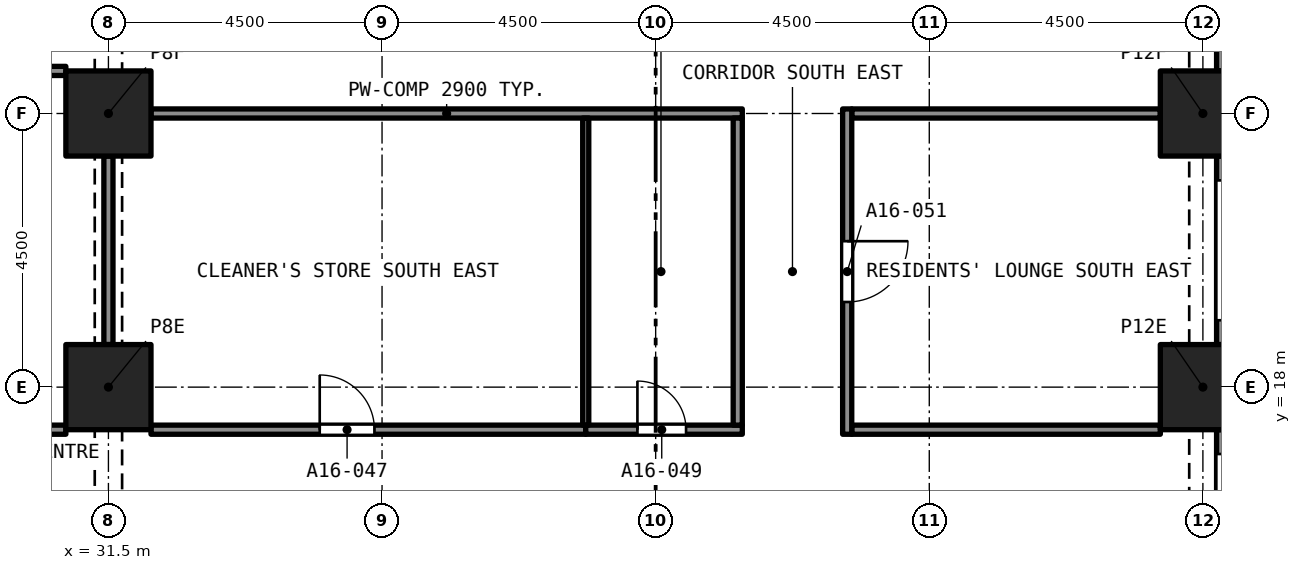
"""IFC4 building model, lengths in metres.
Left out: names, types, materials, properties, quantities, classifications, styles, units other than length and angle.
Written with IfcOpenShell. Run it as: python <this file> out.ifc"""

import sys

from ifc_helpers import new_model, si_unit, direction, frame, frame_2d, origin, origin_2d, place, context, subcontext, project, spatial, rectangle, extrude, element, fill, save


model = new_model("IFC4")
c1 = context("Model", 3, precision=1e-05, world=origin(), true_north=direction((0.0, 1.0)))
c2 = subcontext(c1, "Body", "Model", "MODEL_VIEW")
j1 = project(units=[si_unit("LENGTHUNIT", "METRE"), si_unit("PLANEANGLEUNIT", "RADIAN")], contexts=[c1])
p1 = place(None, origin())
s1 = spatial("IfcSite", under=j1, at=p1, CompositionType="ELEMENT")
p2 = place(p1, origin())
s2 = spatial("IfcBuilding", under=s1, at=p2, CompositionType="ELEMENT")
p3 = place(p2, frame((0.0, 0.0, 62.4)))
s3 = spatial("IfcBuildingStorey", under=s2, at=p3, CompositionType="ELEMENT", Elevation=62.4)
for number, where, z_axis, x_axis in (
    (1, (31.5, 18.0, 0.0), (0.0, 0.0, 1.0), (1.0, 0.0, 0.0)),
    (2, (49.5, 18.0, 0.0), (0.0, 0.0, 1.0), (1.0, 0.0, 0.0)),
    (3, (31.5, 22.5, 0.0), (0.0, 0.0, 1.0), (1.0, 0.0, 0.0)),
    (4, (49.5, 22.5, 0.0), (0.0, 0.0, 1.0), (1.0, 0.0, 0.0)),
):
    element("IfcColumn", number, at=place(p3, frame(where, z_axis=z_axis, x_axis=x_axis)), inside=s3, PredefinedType="COLUMN", context=c2, shape_type="SweptSolid", body=[
        extrude(rectangle(XDim=1.4, YDim=1.4, at=origin_2d()), origin(), (0.0, 0.0, 1.0), 3.2),
    ])
p4 = place(p3, frame((49.875, 17.3, 0.0), z_axis=(0.0, 0.0, 1.0), x_axis=(0.0, -1.0, 0.0)))
e5 = element("IfcWall", 5, at=p4, inside=s3, PredefinedType="SOLIDWALL", context=c2, shape_type="SweptSolid", body=[
    extrude(rectangle(XDim=3.1, YDim=0.3, at=frame_2d((1.55, 0.0))), origin(), (0.0, 0.0, 1.0), 3.2),
])
p5 = place(p4, frame((0.4, 0.0, 0.45)))
e6 = element("IfcOpeningElement", 6, at=p5, cuts=e5, PredefinedType="OPENING", context=c2, shape_type="SweptSolid", body=[
    extrude(rectangle(XDim=2.3, YDim=1.95, at=frame_2d((1.15, 0.975))), frame((0.0, 0.16, 0.0), z_axis=(0.0, -1.0, 0.0), x_axis=(1.0, 0.0, 0.0)), (0.0, 0.0, 1.0), 0.32),
])
p6 = place(p3, frame((49.875, 21.8, 0.0), z_axis=(0.0, 0.0, 1.0), x_axis=(0.0, -1.0, 0.0)))
e7 = element("IfcWall", 7, at=p6, inside=s3, PredefinedType="SOLIDWALL", context=c2, shape_type="SweptSolid", body=[
    extrude(rectangle(XDim=3.1, YDim=0.3, at=frame_2d((1.55, 0.0))), origin(), (0.0, 0.0, 1.0), 3.2),
])
p7 = place(p6, frame((0.4, 0.0, 0.45)))
e8 = element("IfcOpeningElement", 8, at=p7, cuts=e7, PredefinedType="OPENING", context=c2, shape_type="SweptSolid", body=[
    extrude(rectangle(XDim=2.3, YDim=1.95, at=frame_2d((1.15, 0.975))), frame((0.0, 0.16, 0.0), z_axis=(0.0, -1.0, 0.0), x_axis=(1.0, 0.0, 0.0)), (0.0, 0.0, 1.0), 0.32),
])
p8 = place(p3, frame((49.875, 26.3, 0.0), z_axis=(0.0, 0.0, 1.0), x_axis=(0.0, -1.0, 0.0)))
e9 = element("IfcWall", 9, at=p8, inside=s3, PredefinedType="SOLIDWALL", context=c2, shape_type="SweptSolid", body=[
    extrude(rectangle(XDim=3.1, YDim=0.3, at=frame_2d((1.55, 0.0))), origin(), (0.0, 0.0, 1.0), 3.2),
])
p9 = place(p8, frame((0.4, 0.0, 0.45)))
e10 = element("IfcOpeningElement", 10, at=p9, cuts=e9, PredefinedType="OPENING", context=c2, shape_type="SweptSolid", body=[
    extrude(rectangle(XDim=2.3, YDim=1.95, at=frame_2d((1.15, 0.975))), frame((0.0, 0.16, 0.0), z_axis=(0.0, -1.0, 0.0), x_axis=(1.0, 0.0, 0.0)), (0.0, 0.0, 1.0), 0.32),
])
p10 = place(p3, frame((25.725, 17.3, 0.0), z_axis=(0.0, 0.0, 1.0), x_axis=(1.0, 0.0, 0.0)))
e11 = element("IfcWall", 11, at=p10, inside=s3, PredefinedType="PARTITIONING", context=c2, shape_type="SweptSolid", body=[
    extrude(rectangle(XDim=5.075, YDim=0.15, at=frame_2d((2.538, 0.0))), origin(), (0.0, 0.0, 1.0), 2.75),
])
p11 = place(p3, frame((32.2, 17.3, 0.0), z_axis=(0.0, 0.0, 1.0), x_axis=(1.0, 0.0, 0.0)))
e12 = element("IfcWall", 12, at=p11, inside=s3, PredefinedType="PARTITIONING", context=c2, shape_type="SweptSolid", body=[
    extrude(rectangle(XDim=7.15, YDim=0.15, at=frame_2d((3.575, 0.0))), origin(), (0.0, 0.0, 1.0), 2.9),
])
p12 = place(p11, frame((2.775, 0.0, 0.0)))
e13 = element("IfcOpeningElement", 13, at=p12, cuts=e12, PredefinedType="OPENING", context=c2, shape_type="SweptSolid", body=[
    extrude(rectangle(XDim=0.9, YDim=2.1, at=frame_2d((0.45, 1.05))), frame((0.0, 0.085, 0.0), z_axis=(0.0, -1.0, 0.0), x_axis=(1.0, 0.0, 0.0)), (0.0, 0.0, 1.0), 0.17),
])
p13 = place(p3, frame((39.35, 17.3, 0.0), z_axis=(0.0, 0.0, 1.0), x_axis=(1.0, 0.0, 0.0)))
e14 = element("IfcWall", 14, at=p13, inside=s3, PredefinedType="PARTITIONING", context=c2, shape_type="SweptSolid", body=[
    extrude(rectangle(XDim=2.575, YDim=0.15, at=frame_2d((1.288, 0.0))), origin(), (0.0, 0.0, 1.0), 2.9),
])
p14 = place(p13, frame((0.85, 0.0, 0.0)))
e15 = element("IfcOpeningElement", 15, at=p14, cuts=e14, PredefinedType="OPENING", context=c2, shape_type="SweptSolid", body=[
    extrude(rectangle(XDim=0.8, YDim=2.1, at=frame_2d((0.4, 1.05))), frame((0.0, 0.085, 0.0), z_axis=(0.0, -1.0, 0.0), x_axis=(1.0, 0.0, 0.0)), (0.0, 0.0, 1.0), 0.17),
])
p15 = place(p3, frame((43.725, 17.3, 0.0), z_axis=(0.0, 0.0, 1.0), x_axis=(1.0, 0.0, 0.0)))
e16 = element("IfcWall", 16, at=p15, inside=s3, PredefinedType="PARTITIONING", context=c2, shape_type="SweptSolid", body=[
    extrude(rectangle(XDim=5.075, YDim=0.15, at=frame_2d((2.538, 0.0))), origin(), (0.0, 0.0, 1.0), 2.9),
])
p16 = place(p3, frame((25.725, 23.2, 0.0), z_axis=(0.0, 0.0, 1.0), x_axis=(1.0, 0.0, 0.0)))
e17 = element("IfcWall", 17, at=p16, inside=s3, PredefinedType="PARTITIONING", context=c2, shape_type="SweptSolid", body=[
    extrude(rectangle(XDim=5.075, YDim=0.15, at=frame_2d((2.538, 0.0))), origin(), (0.0, 0.0, 1.0), 2.75),
])
p17 = place(p3, frame((31.5, 18.7, 0.0), z_axis=(0.0, 0.0, 1.0), x_axis=(0.0, 1.0, 0.0)))
e18 = element("IfcWall", 18, at=p17, inside=s3, PredefinedType="PARTITIONING", context=c2, shape_type="SweptSolid", body=[
    extrude(rectangle(XDim=3.1, YDim=0.15, at=frame_2d((1.55, 0.0))), origin(), (0.0, 0.0, 1.0), 2.38),
])
p18 = place(p3, frame((32.2, 22.5, 0.0), z_axis=(0.0, 0.0, 1.0), x_axis=(1.0, 0.0, 0.0)))
e19 = element("IfcWall", 19, at=p18, inside=s3, PredefinedType="PARTITIONING", context=c2, shape_type="SweptSolid", body=[
    extrude(rectangle(XDim=9.725, YDim=0.15, at=frame_2d((4.863, 0.0))), origin(), (0.0, 0.0, 1.0), 2.9),
])
p19 = place(p3, frame((43.725, 22.5, 0.0), z_axis=(0.0, 0.0, 1.0), x_axis=(1.0, 0.0, 0.0)))
e20 = element("IfcWall", 20, at=p19, inside=s3, PredefinedType="PARTITIONING", context=c2, shape_type="SweptSolid", body=[
    extrude(rectangle(XDim=5.075, YDim=0.15, at=frame_2d((2.538, 0.0))), origin(), (0.0, 0.0, 1.0), 2.9),
])
p20 = place(p3, frame((41.85, 17.375, 0.0), z_axis=(0.0, 0.0, 1.0), x_axis=(0.0, 1.0, 0.0)))
e21 = element("IfcWall", 21, at=p20, inside=s3, PredefinedType="PARTITIONING", context=c2, shape_type="SweptSolid", body=[
    extrude(rectangle(XDim=5.05, YDim=0.15, at=frame_2d((2.525, 0.0))), origin(), (0.0, 0.0, 1.0), 2.9),
])
p21 = place(p3, frame((43.65, 22.575, 0.0), z_axis=(0.0, 0.0, 1.0), x_axis=(0.0, -1.0, 0.0)))
e22 = element("IfcWall", 22, at=p21, inside=s3, PredefinedType="PARTITIONING", context=c2, shape_type="SweptSolid", body=[
    extrude(rectangle(XDim=5.35, YDim=0.15, at=frame_2d((2.675, 0.0))), origin(), (0.0, 0.0, 1.0), 2.9),
])
p22 = place(p21, frame((2.175, 0.0, 0.0)))
e23 = element("IfcOpeningElement", 23, at=p22, cuts=e22, PredefinedType="OPENING", context=c2, shape_type="SweptSolid", body=[
    extrude(rectangle(XDim=1.0, YDim=2.1, at=frame_2d((0.5, 1.05))), frame((0.0, 0.085, 0.0), z_axis=(0.0, -1.0, 0.0), x_axis=(1.0, 0.0, 0.0)), (0.0, 0.0, 1.0), 0.17),
])
p23 = place(p3, frame((39.35, 17.375, 0.0), z_axis=(0.0, 0.0, 1.0), x_axis=(0.0, 1.0, 0.0)))
e24 = element("IfcWall", 24, at=p23, inside=s3, PredefinedType="PARTITIONING", context=c2, shape_type="SweptSolid", body=[
    extrude(rectangle(XDim=5.05, YDim=0.1, at=frame_2d((2.525, 0.0))), origin(), (0.0, 0.0, 1.0), 2.9),
])
p24 = place(p12, origin())
e25 = element("IfcDoor", 25, at=p24, inside=s3, OperationType="SINGLE_SWING_LEFT", PredefinedType="DOOR", context=c2, shape_type="SweptSolid", body=[
    extrude(rectangle(XDim=0.9, YDim=2.1, at=frame_2d((0.45, 1.05))), frame((0.0, 0.025, 0.0), z_axis=(0.0, -1.0, 0.0), x_axis=(1.0, 0.0, 0.0)), (0.0, 0.0, 1.0), 0.05),
])
fill(e13, e25)
p25 = place(p14, origin())
e26 = element("IfcDoor", 26, at=p25, inside=s3, OperationType="SINGLE_SWING_LEFT", PredefinedType="DOOR", context=c2, shape_type="SweptSolid", body=[
    extrude(rectangle(XDim=0.8, YDim=2.1, at=frame_2d((0.4, 1.05))), frame((0.0, 0.025, 0.0), z_axis=(0.0, -1.0, 0.0), x_axis=(1.0, 0.0, 0.0)), (0.0, 0.0, 1.0), 0.05),
])
fill(e15, e26)
p26 = place(p22, origin())
e27 = element("IfcDoor", 27, at=p26, inside=s3, OperationType="SINGLE_SWING_RIGHT", PredefinedType="DOOR", context=c2, shape_type="SweptSolid", body=[
    extrude(rectangle(XDim=1.0, YDim=2.1, at=frame_2d((0.5, 1.05))), frame((0.0, 0.025, 0.0), z_axis=(0.0, -1.0, 0.0), x_axis=(1.0, 0.0, 0.0)), (0.0, 0.0, 1.0), 0.05),
])
fill(e23, e27)
save(model, sys.argv[1])
